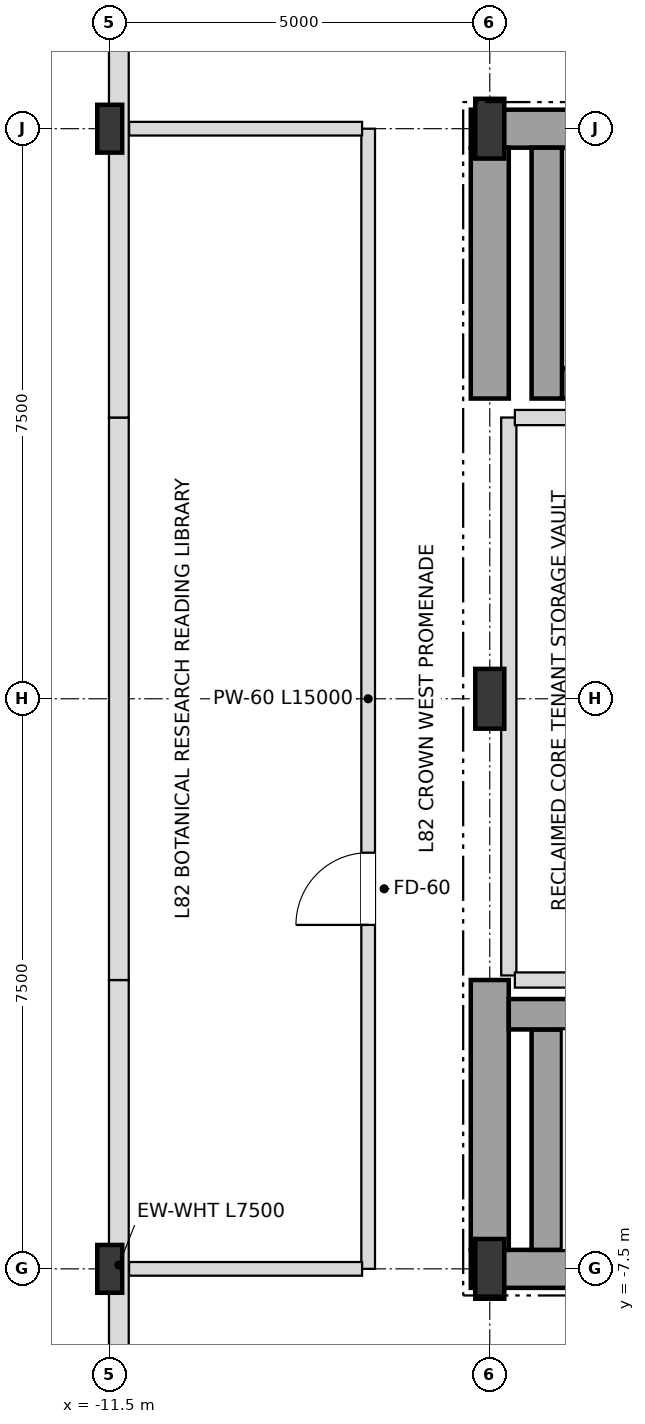
"""IFC4 building model, lengths in metres.
Left out: names, types, materials, properties, quantities, classifications, styles, units other than length and angle.
Written with IfcOpenShell. Run it as: python <this file> out.ifc"""

import sys

from ifc_helpers import new_model, si_unit, direction, frame, frame_2d, origin, origin_2d, place, context, subcontext, project, spatial, rectangle, i_section, extrude, element, fill, save


model = new_model("IFC4")
c1 = context("Model", 3, precision=1e-05, world=origin(), true_north=direction((0.0, 1.0)))
c2 = subcontext(c1, "Body", "Model", "MODEL_VIEW")
j1 = project(units=[si_unit("LENGTHUNIT", "METRE"), si_unit("PLANEANGLEUNIT", "RADIAN")], contexts=[c1])
p1 = place(None, origin())
s1 = spatial("IfcSite", under=j1, at=p1, CompositionType="ELEMENT")
p2 = place(p1, origin())
s2 = spatial("IfcBuilding", under=s1, at=p2, CompositionType="ELEMENT")
p3 = place(p2, frame((0.0, 0.0, 314.4)))
s3 = spatial("IfcBuildingStorey", under=s2, at=p3, CompositionType="ELEMENT", Elevation=314.4)
for number, where, z_axis, x_axis in (
    (1, (-6.5, -7.5, 0.0), (0.0, 0.0, 1.0), (1.0, 0.0, 0.0)),
    (2, (-6.5, 0.0, 0.0), (0.0, 0.0, 1.0), (1.0, 0.0, 0.0)),
    (3, (-6.5, 7.5, 0.0), (0.0, 0.0, 1.0), (1.0, 0.0, 0.0)),
):
    element("IfcColumn", number, at=place(p3, frame(where, z_axis=z_axis, x_axis=x_axis)), inside=s3, PredefinedType="COLUMN", context=c2, shape_type="SweptSolid", body=[
        extrude(i_section(OverallWidth=0.382, OverallDepth=0.786, WebThickness=0.02, FlangeThickness=0.033, at=origin_2d()), origin(), (0.0, 0.0, 1.0), 4.5),
    ])
for number, where, z_axis, x_axis in (
    (4, (-11.5, -7.5, 0.0), (0.0, 0.0, 1.0), (1.0, 0.0, 0.0)),
    (5, (-11.5, 7.5, 0.0), (0.0, 0.0, 1.0), (1.0, 0.0, 0.0)),
):
    element("IfcColumn", number, at=place(p3, frame(where, z_axis=z_axis, x_axis=x_axis)), inside=s3, PredefinedType="COLUMN", context=c2, shape_type="SweptSolid", body=[
        extrude(i_section(OverallWidth=0.328, OverallDepth=0.629, WebThickness=0.014, FlangeThickness=0.021, at=origin_2d()), origin(), (0.0, 0.0, 1.0), 4.5),
    ])
p4 = place(p3, frame((-11.38, -3.7, 0.0), z_axis=(0.0, 0.0, 1.0), x_axis=(0.0, -1.0, 0.0)))
e6 = element("IfcWall", 6, at=p4, inside=s3, PredefinedType="SOLIDWALL", context=c2, shape_type="SweptSolid", body=[
    extrude(rectangle(XDim=7.5, YDim=0.26, at=frame_2d((3.75, 0.0))), origin(), (0.0, 0.0, 1.0), 3.918),
])
p5 = place(p3, frame((-11.38, 3.7, 0.0), z_axis=(0.0, 0.0, 1.0), x_axis=(0.0, -1.0, 0.0)))
e7 = element("IfcWall", 7, at=p5, inside=s3, PredefinedType="SOLIDWALL", context=c2, shape_type="SweptSolid", body=[
    extrude(rectangle(XDim=7.4, YDim=0.26, at=frame_2d((3.7, 0.0))), origin(), (0.0, 0.0, 1.0), 3.918),
])
p6 = place(p3, frame((-11.38, 11.2, 0.0), z_axis=(0.0, 0.0, 1.0), x_axis=(0.0, -1.0, 0.0)))
e8 = element("IfcWall", 8, at=p6, inside=s3, PredefinedType="SOLIDWALL", context=c2, shape_type="SweptSolid", body=[
    extrude(rectangle(XDim=7.5, YDim=0.26, at=frame_2d((3.75, 0.0))), origin(), (0.0, 0.0, 1.0), 3.918),
])
p7 = place(p3, frame((-6.75, -7.5, 0.0), z_axis=(0.0, 0.0, 1.0), x_axis=(1.0, 0.0, 0.0)))
e9 = element("IfcWall", 9, at=p7, inside=s3, PredefinedType="SHEAR", context=c2, shape_type="SweptSolid", body=[
    extrude(rectangle(XDim=6.75, YDim=0.5, at=frame_2d((3.375, 0.0))), origin(), (0.0, 0.0, 1.0), 4.25),
])
p8 = place(p3, frame((-6.75, 7.5, 0.0), z_axis=(0.0, 0.0, 1.0), x_axis=(1.0, 0.0, 0.0)))
e10 = element("IfcWall", 10, at=p8, inside=s3, PredefinedType="SHEAR", context=c2, shape_type="SweptSolid", body=[
    extrude(rectangle(XDim=6.75, YDim=0.5, at=frame_2d((3.375, 0.0))), origin(), (0.0, 0.0, 1.0), 4.25),
])
p9 = place(p8, frame((1.65, 0.0, 0.0)))
e11 = element("IfcOpeningElement", 11, at=p9, cuts=e10, PredefinedType="OPENING", context=c2, shape_type="SweptSolid", body=[
    extrude(rectangle(XDim=1.05, YDim=2.15, at=frame_2d((0.525, 1.075))), frame((0.0, 0.26, 0.0), z_axis=(0.0, -1.0, 0.0), x_axis=(1.0, 0.0, 0.0)), (0.0, 0.0, 1.0), 0.52),
])
p10 = place(p3, frame((-6.5, -7.25, 0.0), z_axis=(0.0, 0.0, 1.0), x_axis=(0.0, 1.0, 0.0)))
e12 = element("IfcWall", 12, at=p10, inside=s3, PredefinedType="SHEAR", context=c2, shape_type="SweptSolid", body=[
    extrude(rectangle(XDim=3.55, YDim=0.5, at=frame_2d((1.775, 0.0))), origin(), (0.0, 0.0, 1.0), 4.25),
])
p11 = place(p3, frame((-6.5, 3.95, 0.0), z_axis=(0.0, 0.0, 1.0), x_axis=(0.0, 1.0, 0.0)))
e13 = element("IfcWall", 13, at=p11, inside=s3, PredefinedType="SHEAR", context=c2, shape_type="SweptSolid", body=[
    extrude(rectangle(XDim=3.3, YDim=0.5, at=frame_2d((1.65, 0.0))), origin(), (0.0, 0.0, 1.0), 4.25),
])
p12 = place(p3, frame((-5.75, -7.25, 0.0), z_axis=(0.0, 0.0, 1.0), x_axis=(0.0, 1.0, 0.0)))
e14 = element("IfcWall", 14, at=p12, inside=s3, PredefinedType="SHEAR", context=c2, shape_type="SweptSolid", body=[
    extrude(rectangle(XDim=2.9, YDim=0.4, at=frame_2d((1.45, 0.0))), origin(), (0.0, 0.0, 1.0), 4.25),
])
p13 = place(p3, frame((-6.25, -4.15, 0.0), z_axis=(0.0, 0.0, 1.0), x_axis=(1.0, 0.0, 0.0)))
e15 = element("IfcWall", 15, at=p13, inside=s3, PredefinedType="SHEAR", context=c2, shape_type="SweptSolid", body=[
    extrude(rectangle(XDim=7.78, YDim=0.4, at=frame_2d((3.89, 0.0))), origin(), (0.0, 0.0, 1.0), 4.25),
])
p14 = place(p3, frame((-5.55, 4.15, 0.0), z_axis=(0.0, 0.0, 1.0), x_axis=(1.0, 0.0, 0.0)))
e16 = element("IfcWall", 16, at=p14, inside=s3, PredefinedType="SHEAR", context=c2, shape_type="SweptSolid", body=[
    extrude(rectangle(XDim=7.08, YDim=0.4, at=frame_2d((3.54, 0.0))), origin(), (0.0, 0.0, 1.0), 4.25),
])
p15 = place(p3, frame((-5.75, 3.95, 0.0), z_axis=(0.0, 0.0, 1.0), x_axis=(0.0, 1.0, 0.0)))
e17 = element("IfcWall", 17, at=p15, inside=s3, PredefinedType="SHEAR", context=c2, shape_type="SweptSolid", body=[
    extrude(rectangle(XDim=3.3, YDim=0.4, at=frame_2d((1.65, 0.0))), origin(), (0.0, 0.0, 1.0), 4.25),
])
p16 = place(p3, frame((-8.1, -7.5, 0.0), z_axis=(0.0, 0.0, 1.0), x_axis=(0.0, 1.0, 0.0)))
e18 = element("IfcWall", 18, at=p16, inside=s3, PredefinedType="PARTITIONING", context=c2, shape_type="SweptSolid", body=[
    extrude(rectangle(XDim=15.0, YDim=0.18, at=frame_2d((7.5, 0.0))), origin(), (0.0, 0.0, 1.0), 4.25),
])
p17 = place(p16, frame((4.525, 0.0, 0.0)))
e19 = element("IfcOpeningElement", 19, at=p17, cuts=e18, PredefinedType="OPENING", context=c2, shape_type="SweptSolid", body=[
    extrude(rectangle(XDim=0.95, YDim=2.15, at=frame_2d((0.475, 1.075))), frame((0.0, 0.1, 0.0), z_axis=(0.0, -1.0, 0.0), x_axis=(1.0, 0.0, 0.0)), (0.0, 0.0, 1.0), 0.2),
])
p18 = place(p3, frame((-6.25, -3.64, 0.0), z_axis=(0.0, 0.0, 1.0), x_axis=(0.0, 1.0, 0.0)))
e20 = element("IfcWall", 20, at=p18, inside=s3, PredefinedType="SOLIDWALL", context=c2, shape_type="SweptSolid", body=[
    extrude(rectangle(XDim=7.34, YDim=0.2, at=frame_2d((3.67, 0.0))), origin(), (0.0, 0.0, 1.0), 4.25),
])
p19 = place(p3, frame((-11.245, -7.5, 0.0), z_axis=(0.0, 0.0, 1.0), x_axis=(1.0, 0.0, 0.0)))
e21 = element("IfcWall", 21, at=p19, inside=s3, PredefinedType="PARTITIONING", context=c2, shape_type="SweptSolid", body=[
    extrude(rectangle(XDim=3.065, YDim=0.18, at=frame_2d((1.533, 0.0))), origin(), (0.0, 0.0, 1.0), 3.918),
])
for number, where, z_axis, x_axis in (
    (22, (-6.17, -3.7, 0.0), (0.0, 0.0, 1.0), (1.0, 0.0, 0.0)),
    (23, (-6.17, 3.7, 0.0), (0.0, 0.0, 1.0), (1.0, 0.0, 0.0)),
):
    element("IfcWall", number, at=place(p3, frame(where, z_axis=z_axis, x_axis=x_axis)), inside=s3, PredefinedType="SOLIDWALL", context=c2, shape_type="SweptSolid", body=[
        extrude(rectangle(XDim=1.94, YDim=0.2, at=frame_2d((0.97, 0.0))), origin(), (0.0, 0.0, 1.0), 4.25),
    ])
p20 = place(p3, frame((-11.245, 7.5, 0.0), z_axis=(0.0, 0.0, 1.0), x_axis=(1.0, 0.0, 0.0)))
e24 = element("IfcWall", 24, at=p20, inside=s3, PredefinedType="PARTITIONING", context=c2, shape_type="SweptSolid", body=[
    extrude(rectangle(XDim=3.065, YDim=0.18, at=frame_2d((1.533, 0.0))), origin(), (0.0, 0.0, 1.0), 3.918),
])
p21 = place(p17, origin())
e25 = element("IfcDoor", 25, at=p21, inside=s3, OperationType="SINGLE_SWING_LEFT", PredefinedType="DOOR", context=c2, shape_type="SweptSolid", body=[
    extrude(rectangle(XDim=0.95, YDim=2.15, at=frame_2d((0.475, 1.075))), frame((0.0, 0.025, 0.0), z_axis=(0.0, -1.0, 0.0), x_axis=(1.0, 0.0, 0.0)), (0.0, 0.0, 1.0), 0.05),
])
fill(e19, e25)
save(model, sys.argv[1])
